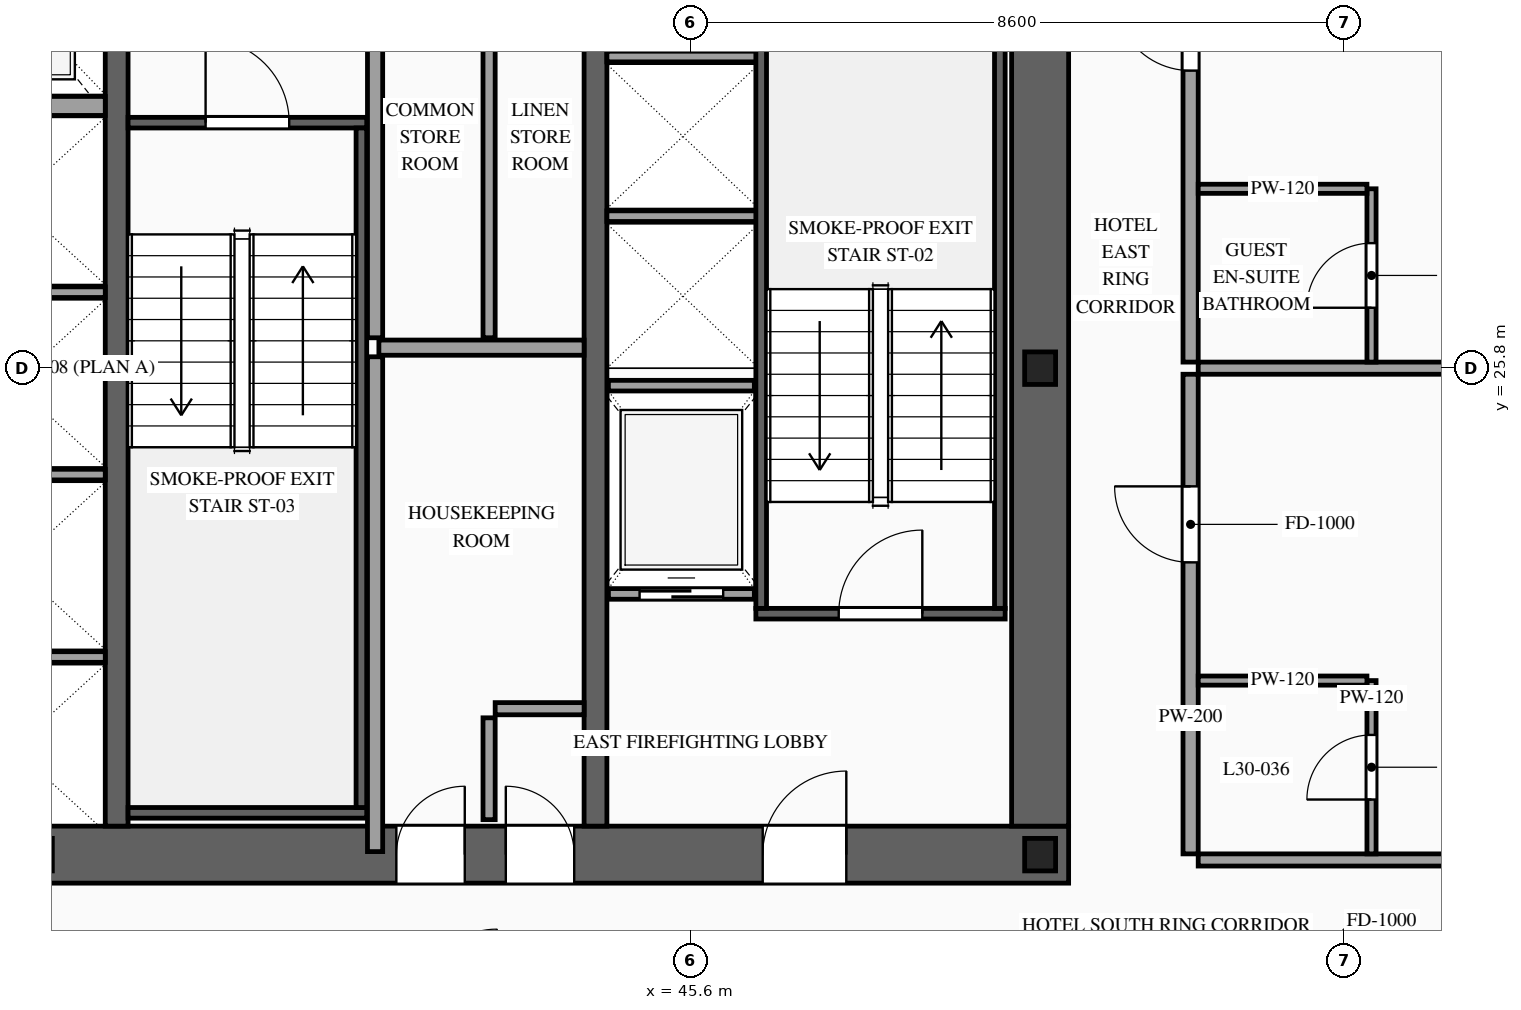
"""IFC4 building model, lengths in metres.
Left out: names, types, materials, properties, quantities, classifications, styles, units other than length and angle.
Written with IfcOpenShell. Run it as: python <this file> out.ifc"""

import sys

from ifc_helpers import new_model, si_unit, direction, frame, frame_2d, origin, origin_2d, place, context, subcontext, project, spatial, rectangle, i_section, extrude, source, transform, mapped, element, fill, save


model = new_model("IFC4")
c1 = context("Model", 3, precision=1e-05, world=origin(), true_north=direction((0.0, 1.0)))
c2 = subcontext(c1, "Body", "Model", "MODEL_VIEW")
j1 = project(units=[si_unit("LENGTHUNIT", "METRE"), si_unit("PLANEANGLEUNIT", "RADIAN")], contexts=[c1])
p1 = place(None, origin())
s1 = spatial("IfcSite", under=j1, at=p1, CompositionType="ELEMENT")
p2 = place(p1, origin())
s2 = spatial("IfcBuilding", under=s1, at=p2, CompositionType="ELEMENT")
p3 = place(p2, frame((0.0, 0.0, 115.4)))
s3 = spatial("IfcBuildingStorey", under=s2, at=p3, CompositionType="ELEMENT", Elevation=115.4)
p4 = place(p3, frame((23.425, 19.4, 0.0), z_axis=(0.0, 0.0, 1.0), x_axis=(1.0, 0.0, 0.0)))
e1 = element("IfcWall", 1, at=p4, inside=s3, PredefinedType="SHEAR", context=c2, shape_type="SweptSolid", body=[
    extrude(rectangle(XDim=27.15, YDim=0.75, at=frame_2d((13.575, 0.0))), origin(), (0.0, 0.0, 1.0), 3.6),
])
p5 = place(p4, frame((2.025, 0.0, 0.0)))
e2 = element("IfcOpeningElement", 2, at=p5, cuts=e1, PredefinedType="OPENING", context=c2, shape_type="SweptSolid", body=[
    extrude(rectangle(XDim=1.1, YDim=2.2, at=frame_2d((0.55, 1.1))), frame((0.0, 0.39, 0.0), z_axis=(0.0, -1.0, 0.0), x_axis=(1.0, 0.0, 0.0)), (0.0, 0.0, 1.0), 0.78),
])
p6 = place(p4, frame((9.925, 0.0, 0.0)))
e3 = element("IfcOpeningElement", 3, at=p6, cuts=e1, PredefinedType="OPENING", context=c2, shape_type="SweptSolid", body=[
    extrude(rectangle(XDim=1.1, YDim=2.2, at=frame_2d((0.55, 1.1))), frame((0.0, 0.39, 0.0), z_axis=(0.0, -1.0, 0.0), x_axis=(1.0, 0.0, 0.0)), (0.0, 0.0, 1.0), 0.78),
])
p7 = place(p4, frame((23.125, 0.0, 0.0)))
e4 = element("IfcOpeningElement", 4, at=p7, cuts=e1, PredefinedType="OPENING", context=c2, shape_type="SweptSolid", body=[
    extrude(rectangle(XDim=1.1, YDim=2.2, at=frame_2d((0.55, 1.1))), frame((0.0, 0.39, 0.0), z_axis=(0.0, -1.0, 0.0), x_axis=(1.0, 0.0, 0.0)), (0.0, 0.0, 1.0), 0.78),
])
p8 = place(p4, frame((19.745, 0.0, 0.0)))
e5 = element("IfcOpeningElement", 5, at=p8, cuts=e1, PredefinedType="OPENING", context=c2, shape_type="SweptSolid", body=[
    extrude(rectangle(XDim=0.9, YDim=2.15, at=frame_2d((0.45, 1.075))), frame((0.0, 0.39, 0.0), z_axis=(0.0, -1.0, 0.0), x_axis=(1.0, 0.0, 0.0)), (0.0, 0.0, 1.0), 0.78),
])
p9 = place(p4, frame((18.305, 0.0, 0.0)))
e6 = element("IfcOpeningElement", 6, at=p9, cuts=e1, PredefinedType="OPENING", context=c2, shape_type="SweptSolid", body=[
    extrude(rectangle(XDim=0.9, YDim=2.15, at=frame_2d((0.45, 1.075))), frame((0.0, 0.39, 0.0), z_axis=(0.0, -1.0, 0.0), x_axis=(1.0, 0.0, 0.0)), (0.0, 0.0, 1.0), 0.78),
])
m1 = source(origin(), c2, "Body", "SweptSolid", [
    extrude(rectangle(XDim=12.05, YDim=0.75, at=frame_2d((6.025, 0.0))), origin(), (0.0, 0.0, 1.0), 3.6),
])
p10 = place(p3, frame((50.2, 19.775, 0.0), z_axis=(0.0, 0.0, 1.0), x_axis=(0.0, 1.0, 0.0)))
e7 = element("IfcWall", 7, at=p10, inside=s3, PredefinedType="SHEAR", context=c2, shape_type="MappedRepresentation", body=[
    mapped(m1, transform((0.0, 0.0, 0.0), scale=1.0)),
])
m2 = source(origin(), c2, "Body", "SweptSolid", [
    extrude(rectangle(XDim=12.05, YDim=0.3, at=frame_2d((6.025, 0.0))), origin(), (0.0, 0.0, 1.0), 3.6),
])
for number, where, z_axis, x_axis in (
    (8, (38.05, 19.775, 0.0), (0.0, 0.0, 1.0), (0.0, 1.0, 0.0)),
    (9, (44.35, 19.775, 0.0), (0.0, 0.0, 1.0), (0.0, 1.0, 0.0)),
):
    element("IfcWall", number, at=place(p3, frame(where, z_axis=z_axis, x_axis=x_axis)), inside=s3, PredefinedType="SOLIDWALL", context=c2, shape_type="MappedRepresentation", body=[
        mapped(m2, transform((0.0, 0.0, 0.0), scale=1.0)),
    ])
m3 = source(origin(), c2, "Body", "SweptSolid", [
    extrude(i_section(OverallWidth=0.407, OverallDepth=0.428, WebThickness=0.02, FlangeThickness=0.035, at=origin_2d()), origin(), (0.0, 0.0, 1.0), 3.6),
])
for number, where, z_axis, x_axis in (
    (10, (37.0, 19.4, 0.0), (0.0, 0.0, 1.0), (1.0, 0.0, 0.0)),
    (11, (50.2, 19.4, 0.0), (0.0, 0.0, 1.0), (1.0, 0.0, 0.0)),
    (12, (50.2, 25.8, 0.0), (0.0, 0.0, 1.0), (1.0, 0.0, 0.0)),
):
    element("IfcColumn", number, at=place(p3, frame(where, z_axis=z_axis, x_axis=x_axis)), inside=s3, PredefinedType="COLUMN", context=c2, shape_type="MappedRepresentation", body=[
        mapped(m3, transform((0.0, 0.0, 0.0), scale=1.0)),
    ])
p11 = place(p3, frame((44.52, 22.83, 0.0), z_axis=(0.0, 0.0, 1.0), x_axis=(1.0, 0.0, 0.0)))
e13 = element("IfcWall", 13, at=p11, inside=s3, PredefinedType="SOLIDWALL", context=c2, shape_type="SweptSolid", body=[
    extrude(rectangle(XDim=1.92, YDim=0.14, at=frame_2d((0.96, 0.0))), origin(), (0.0, 0.0, 1.0), 3.38),
])
p12 = place(p11, frame((0.41, 0.0, 0.0)))
e14 = element("IfcOpeningElement", 14, at=p12, cuts=e13, PredefinedType="OPENING", context=c2, shape_type="SweptSolid", body=[
    extrude(rectangle(XDim=1.1, YDim=2.2, at=frame_2d((0.55, 1.1))), frame((0.0, 0.085, 0.0), z_axis=(0.0, -1.0, 0.0), x_axis=(1.0, 0.0, 0.0)), (0.0, 0.0, 1.0), 0.17),
])
m4 = source(origin(), c2, "Body", "SweptSolid", [
    extrude(rectangle(XDim=1.92, YDim=0.14, at=frame_2d((0.96, 0.0))), origin(), (0.0, 0.0, 1.0), 3.38),
])
p13 = place(p3, frame((44.52, 25.57, 0.0), z_axis=(0.0, 0.0, 1.0), x_axis=(1.0, 0.0, 0.0)))
e15 = element("IfcWall", 15, at=p13, inside=s3, PredefinedType="SOLIDWALL", context=c2, shape_type="MappedRepresentation", body=[
    mapped(m4, transform((0.0, 0.0, 0.0), scale=1.0)),
])
m5 = source(origin(), c2, "Body", "SweptSolid", [
    extrude(rectangle(XDim=2.4, YDim=0.14, at=frame_2d((1.2, 0.0))), origin(), (0.0, 0.0, 1.0), 3.38),
])
for number, where, z_axis, x_axis in (
    (16, (35.5, 22.0, 0.0), (0.0, 0.0, 1.0), (1.0, 0.0, 0.0)),
    (17, (35.5, 24.4, 0.0), (0.0, 0.0, 1.0), (1.0, 0.0, 0.0)),
    (18, (35.5, 26.8, 0.0), (0.0, 0.0, 1.0), (1.0, 0.0, 0.0)),
):
    element("IfcWall", number, at=place(p3, frame(where, z_axis=z_axis, x_axis=x_axis)), inside=s3, PredefinedType="SOLIDWALL", context=c2, shape_type="MappedRepresentation", body=[
        mapped(m5, transform((0.0, 0.0, 0.0), scale=1.0)),
    ])
m6 = source(origin(), c2, "Body", "SweptSolid", [
    extrude(rectangle(XDim=2.4, YDim=0.25, at=frame_2d((1.2, 0.0))), origin(), (0.0, 0.0, 1.0), 3.38),
])
p14 = place(p3, frame((35.5, 29.25, 0.0), z_axis=(0.0, 0.0, 1.0), x_axis=(1.0, 0.0, 0.0)))
e19 = element("IfcWall", 19, at=p14, inside=s3, PredefinedType="SOLIDWALL", context=c2, shape_type="MappedRepresentation", body=[
    mapped(m6, transform((0.0, 0.0, 0.0), scale=1.0)),
])
m7 = source(origin(), c2, "Body", "SweptSolid", [
    extrude(rectangle(XDim=2.0, YDim=0.14, at=frame_2d((1.0, 0.0))), origin(), (0.0, 0.0, 1.0), 3.38),
])
for number, where, z_axis, x_axis in (
    (20, (44.5, 27.8, 0.0), (0.0, 0.0, 1.0), (1.0, 0.0, 0.0)),
    (21, (44.5, 29.9, 0.0), (0.0, 0.0, 1.0), (1.0, 0.0, 0.0)),
):
    element("IfcWall", number, at=place(p3, frame(where, z_axis=z_axis, x_axis=x_axis)), inside=s3, PredefinedType="SOLIDWALL", context=c2, shape_type="MappedRepresentation", body=[
        mapped(m7, transform((0.0, 0.0, 0.0), scale=1.0)),
    ])
p15 = place(p3, frame((46.46, 22.57, 0.0), z_axis=(0.0, 0.0, 1.0), x_axis=(1.0, 0.0, 0.0)))
e22 = element("IfcWall", 22, at=p15, inside=s3, PredefinedType="SOLIDWALL", context=c2, shape_type="SweptSolid", body=[
    extrude(rectangle(XDim=3.28, YDim=0.14, at=frame_2d((1.64, 0.0))), origin(), (0.0, 0.0, 1.0), 3.38),
])
p16 = place(p15, frame((1.09, 0.0, 0.0)))
e23 = element("IfcOpeningElement", 23, at=p16, cuts=e22, PredefinedType="OPENING", context=c2, shape_type="SweptSolid", body=[
    extrude(rectangle(XDim=1.1, YDim=2.2, at=frame_2d((0.55, 1.1))), frame((0.0, 0.085, 0.0), z_axis=(0.0, -1.0, 0.0), x_axis=(1.0, 0.0, 0.0)), (0.0, 0.0, 1.0), 0.17),
])
m8 = source(origin(), c2, "Body", "SweptSolid", [
    extrude(rectangle(XDim=8.94, YDim=0.14, at=frame_2d((4.47, 0.0))), origin(), (0.0, 0.0, 1.0), 3.38),
])
for number, where, z_axis, x_axis in (
    (24, (46.53, 22.64, 0.0), (0.0, 0.0, 1.0), (0.0, 1.0, 0.0)),
    (25, (49.67, 22.64, 0.0), (0.0, 0.0, 1.0), (0.0, 1.0, 0.0)),
):
    element("IfcWall", number, at=place(p3, frame(where, z_axis=z_axis, x_axis=x_axis)), inside=s3, PredefinedType="SOLIDWALL", context=c2, shape_type="MappedRepresentation", body=[
        mapped(m8, transform((0.0, 0.0, 0.0), scale=1.0)),
    ])
p17 = place(p3, frame((38.2, 29.03, 0.0), z_axis=(0.0, 0.0, 1.0), x_axis=(1.0, 0.0, 0.0)))
e26 = element("IfcWall", 26, at=p17, inside=s3, PredefinedType="SOLIDWALL", context=c2, shape_type="SweptSolid", body=[
    extrude(rectangle(XDim=3.14, YDim=0.14, at=frame_2d((1.57, 0.0))), origin(), (0.0, 0.0, 1.0), 3.38),
])
p18 = place(p17, frame((1.02, 0.0, 0.0)))
e27 = element("IfcOpeningElement", 27, at=p18, cuts=e26, PredefinedType="OPENING", context=c2, shape_type="SweptSolid", body=[
    extrude(rectangle(XDim=1.1, YDim=2.2, at=frame_2d((0.55, 1.1))), frame((0.0, 0.085, 0.0), z_axis=(0.0, -1.0, 0.0), x_axis=(1.0, 0.0, 0.0)), (0.0, 0.0, 1.0), 0.17),
])
m9 = source(origin(), c2, "Body", "SweptSolid", [
    extrude(rectangle(XDim=3.14, YDim=0.14, at=frame_2d((1.57, 0.0))), origin(), (0.0, 0.0, 1.0), 3.38),
])
p19 = place(p3, frame((38.2, 19.95, 0.0), z_axis=(0.0, 0.0, 1.0), x_axis=(1.0, 0.0, 0.0)))
e28 = element("IfcWall", 28, at=p19, inside=s3, PredefinedType="SOLIDWALL", context=c2, shape_type="MappedRepresentation", body=[
    mapped(m9, transform((0.0, 0.0, 0.0), scale=1.0)),
])
m10 = source(origin(), c2, "Body", "SweptSolid", [
    extrude(rectangle(XDim=8.94, YDim=0.14, at=frame_2d((4.47, 0.0))), origin(), (0.0, 0.0, 1.0), 3.38),
])
p20 = place(p3, frame((41.27, 20.02, 0.0), z_axis=(0.0, 0.0, 1.0), x_axis=(0.0, 1.0, 0.0)))
e29 = element("IfcWall", 29, at=p20, inside=s3, PredefinedType="SOLIDWALL", context=c2, shape_type="MappedRepresentation", body=[
    mapped(m10, transform((0.0, 0.0, 0.0), scale=1.0)),
])
m11 = source(origin(), c2, "Body", "SweptSolid", [
    extrude(rectangle(XDim=1.34, YDim=0.16, at=frame_2d((0.67, 0.0))), origin(), (0.0, 0.0, 1.0), 3.38),
])
p21 = place(p3, frame((42.95, 19.86, 0.0), z_axis=(0.0, 0.0, 1.0), x_axis=(0.0, 1.0, 0.0)))
e30 = element("IfcWall", 30, at=p21, inside=s3, PredefinedType="PARTITIONING", context=c2, shape_type="MappedRepresentation", body=[
    mapped(m11, transform((0.0, 0.0, 0.0), scale=1.0)),
])
m12 = source(origin(), c2, "Body", "SweptSolid", [
    extrude(rectangle(XDim=1.17, YDim=0.16, at=frame_2d((0.585, 0.0))), origin(), (0.0, 0.0, 1.0), 3.38),
])
p22 = place(p3, frame((43.03, 21.32, 0.0), z_axis=(0.0, 0.0, 1.0), x_axis=(1.0, 0.0, 0.0)))
e31 = element("IfcWall", 31, at=p22, inside=s3, PredefinedType="PARTITIONING", context=c2, shape_type="MappedRepresentation", body=[
    mapped(m12, transform((0.0, 0.0, 0.0), scale=1.0)),
])
m13 = source(origin(), c2, "Body", "SweptSolid", [
    extrude(rectangle(XDim=6.51, YDim=0.2, at=frame_2d((3.255, 0.0))), origin(), (0.0, 0.0, 1.0), 3.38),
])
p23 = place(p3, frame((41.45, 19.44, 0.0), z_axis=(0.0, 0.0, 1.0), x_axis=(0.0, 1.0, 0.0)))
e32 = element("IfcWall", 32, at=p23, inside=s3, PredefinedType="PARTITIONING", context=c2, shape_type="MappedRepresentation", body=[
    mapped(m13, transform((0.0, 0.0, 0.0), scale=1.0)),
])
m14 = source(origin(), c2, "Body", "SweptSolid", [
    extrude(rectangle(XDim=2.7, YDim=0.2, at=frame_2d((1.35, 0.0))), origin(), (0.0, 0.0, 1.0), 3.38),
])
p24 = place(p3, frame((41.5, 26.07, 0.0), z_axis=(0.0, 0.0, 1.0), x_axis=(1.0, 0.0, 0.0)))
e33 = element("IfcWall", 33, at=p24, inside=s3, PredefinedType="PARTITIONING", context=c2, shape_type="MappedRepresentation", body=[
    mapped(m14, transform((0.0, 0.0, 0.0), scale=1.0)),
])
m15 = source(origin(), c2, "Body", "SweptSolid", [
    extrude(rectangle(XDim=5.96, YDim=0.2, at=frame_2d((2.98, 0.0))), origin(), (0.0, 0.0, 1.0), 3.38),
])
p25 = place(p3, frame((41.45, 26.2, 0.0), z_axis=(0.0, 0.0, 1.0), x_axis=(0.0, 1.0, 0.0)))
e34 = element("IfcWall", 34, at=p25, inside=s3, PredefinedType="PARTITIONING", context=c2, shape_type="MappedRepresentation", body=[
    mapped(m15, transform((0.0, 0.0, 0.0), scale=1.0)),
])
m16 = source(origin(), c2, "Body", "SweptSolid", [
    extrude(rectangle(XDim=5.96, YDim=0.16, at=frame_2d((2.98, 0.0))), origin(), (0.0, 0.0, 1.0), 3.38),
])
p26 = place(p3, frame((42.95, 26.2, 0.0), z_axis=(0.0, 0.0, 1.0), x_axis=(0.0, 1.0, 0.0)))
e35 = element("IfcWall", 35, at=p26, inside=s3, PredefinedType="PARTITIONING", context=c2, shape_type="MappedRepresentation", body=[
    mapped(m16, transform((0.0, 0.0, 0.0), scale=1.0)),
])
p27 = place(p3, frame((52.18, 19.41, 0.0), z_axis=(0.0, 0.0, 1.0), x_axis=(0.0, 1.0, 0.0)))
e36 = element("IfcWall", 36, at=p27, inside=s3, PredefinedType="PARTITIONING", context=c2, shape_type="SweptSolid", body=[
    extrude(rectangle(XDim=6.31, YDim=0.2, at=frame_2d((3.155, 0.0))), origin(), (0.0, 0.0, 1.0), 3.38),
])
p28 = place(p27, frame((3.835, 0.0, 0.0)))
e37 = element("IfcOpeningElement", 37, at=p28, cuts=e36, PredefinedType="OPENING", context=c2, shape_type="SweptSolid", body=[
    extrude(rectangle(XDim=1.0, YDim=2.2, at=frame_2d((0.5, 1.1))), frame((0.0, 0.115, 0.0), z_axis=(0.0, -1.0, 0.0), x_axis=(1.0, 0.0, 0.0)), (0.0, 0.0, 1.0), 0.23),
])
m17 = source(origin(), c2, "Body", "SweptSolid", [
    extrude(rectangle(XDim=8.17, YDim=0.16, at=frame_2d((4.085, 0.0))), origin(), (0.0, 0.0, 1.0), 2.675),
])
p29 = place(p3, frame((52.28, 25.8, 0.0), z_axis=(0.0, 0.0, 1.0), x_axis=(1.0, 0.0, 0.0)))
e38 = element("IfcWall", 38, at=p29, inside=s3, PredefinedType="PARTITIONING", context=c2, shape_type="MappedRepresentation", body=[
    mapped(m17, transform((0.0, 0.0, 0.0), scale=1.0)),
])
m18 = source(origin(), c2, "Body", "SweptSolid", [
    extrude(rectangle(XDim=8.17, YDim=0.16, at=frame_2d((4.085, 0.0))), origin(), (0.0, 0.0, 1.0), 2.875),
])
p30 = place(p3, frame((52.28, 19.33, 0.0), z_axis=(0.0, 0.0, 1.0), x_axis=(1.0, 0.0, 0.0)))
e39 = element("IfcWall", 39, at=p30, inside=s3, PredefinedType="PARTITIONING", context=c2, shape_type="MappedRepresentation", body=[
    mapped(m18, transform((0.0, 0.0, 0.0), scale=1.0)),
])
p31 = place(p3, frame((54.56, 19.41, 0.0), z_axis=(0.0, 0.0, 1.0), x_axis=(0.0, 1.0, 0.0)))
e40 = element("IfcWall", 40, at=p31, inside=s3, PredefinedType="PARTITIONING", context=c2, shape_type="SweptSolid", body=[
    extrude(rectangle(XDim=2.28, YDim=0.12, at=frame_2d((1.14, 0.0))), origin(), (0.0, 0.0, 1.0), 3.38),
])
p32 = place(p31, frame((0.715, 0.0, 0.0)))
e41 = element("IfcOpeningElement", 41, at=p32, cuts=e40, PredefinedType="OPENING", context=c2, shape_type="SweptSolid", body=[
    extrude(rectangle(XDim=0.85, YDim=2.1, at=frame_2d((0.425, 1.05))), frame((0.0, 0.075, 0.0), z_axis=(0.0, -1.0, 0.0), x_axis=(1.0, 0.0, 0.0)), (0.0, 0.0, 1.0), 0.15),
])
m19 = source(origin(), c2, "Body", "SweptSolid", [
    extrude(rectangle(XDim=2.22, YDim=0.12, at=frame_2d((1.11, 0.0))), origin(), (0.0, 0.0, 1.0), 3.38),
])
p33 = place(p3, frame((52.28, 21.69, 0.0), z_axis=(0.0, 0.0, 1.0), x_axis=(1.0, 0.0, 0.0)))
e42 = element("IfcWall", 42, at=p33, inside=s3, PredefinedType="PARTITIONING", context=c2, shape_type="MappedRepresentation", body=[
    mapped(m19, transform((0.0, 0.0, 0.0), scale=1.0)),
])
p34 = place(p3, frame((52.18, 25.88, 0.0), z_axis=(0.0, 0.0, 1.0), x_axis=(0.0, 1.0, 0.0)))
e43 = element("IfcWall", 43, at=p34, inside=s3, PredefinedType="PARTITIONING", context=c2, shape_type="SweptSolid", body=[
    extrude(rectangle(XDim=6.31, YDim=0.2, at=frame_2d((3.155, 0.0))), origin(), (0.0, 0.0, 1.0), 3.38),
])
p35 = place(p34, frame((3.835, 0.0, 0.0)))
e44 = element("IfcOpeningElement", 44, at=p35, cuts=e43, PredefinedType="OPENING", context=c2, shape_type="SweptSolid", body=[
    extrude(rectangle(XDim=1.0, YDim=2.2, at=frame_2d((0.5, 1.1))), frame((0.0, 0.115, 0.0), z_axis=(0.0, -1.0, 0.0), x_axis=(1.0, 0.0, 0.0)), (0.0, 0.0, 1.0), 0.23),
])
p36 = place(p3, frame((54.56, 25.88, 0.0), z_axis=(0.0, 0.0, 1.0), x_axis=(0.0, 1.0, 0.0)))
e45 = element("IfcWall", 45, at=p36, inside=s3, PredefinedType="PARTITIONING", context=c2, shape_type="SweptSolid", body=[
    extrude(rectangle(XDim=2.28, YDim=0.12, at=frame_2d((1.14, 0.0))), origin(), (0.0, 0.0, 1.0), 3.38),
])
p37 = place(p36, frame((0.715, 0.0, 0.0)))
e46 = element("IfcOpeningElement", 46, at=p37, cuts=e45, PredefinedType="OPENING", context=c2, shape_type="SweptSolid", body=[
    extrude(rectangle(XDim=0.85, YDim=2.1, at=frame_2d((0.425, 1.05))), frame((0.0, 0.075, 0.0), z_axis=(0.0, -1.0, 0.0), x_axis=(1.0, 0.0, 0.0)), (0.0, 0.0, 1.0), 0.15),
])
p38 = place(p3, frame((52.28, 28.16, 0.0), z_axis=(0.0, 0.0, 1.0), x_axis=(1.0, 0.0, 0.0)))
e47 = element("IfcWall", 47, at=p38, inside=s3, PredefinedType="PARTITIONING", context=c2, shape_type="MappedRepresentation", body=[
    mapped(m19, transform((0.0, 0.0, 0.0), scale=1.0)),
])
m20 = source(origin(), c2, "Body", "SweptSolid", [
    extrude(rectangle(XDim=1.1, YDim=2.2, at=frame_2d((0.55, 1.1))), frame((0.0, 0.025, 0.0), z_axis=(0.0, -1.0, 0.0), x_axis=(1.0, 0.0, 0.0)), (0.0, 0.0, 1.0), 0.05),
])
p39 = place(p12, origin())
e48 = element("IfcDoor", 48, at=p39, inside=s3, OperationType="SLIDING_TO_RIGHT", PredefinedType="DOOR", context=c2, shape_type="MappedRepresentation", body=[
    mapped(m20, transform((0.0, 0.0, 0.0), scale=1.0)),
])
fill(e14, e48)
m21 = source(origin(), c2, "Body", "SweptSolid", [
    extrude(rectangle(XDim=1.1, YDim=2.2, at=frame_2d((0.55, 1.1))), frame((0.0, 0.025, 0.0), z_axis=(0.0, -1.0, 0.0), x_axis=(1.0, 0.0, 0.0)), (0.0, 0.0, 1.0), 0.05),
])
p40 = place(p16, origin())
e49 = element("IfcDoor", 49, at=p40, inside=s3, OperationType="SINGLE_SWING_RIGHT", PredefinedType="DOOR", context=c2, shape_type="MappedRepresentation", body=[
    mapped(m21, transform((0.0, 0.0, 0.0), scale=1.0)),
])
fill(e23, e49)
p41 = place(p18, origin())
e50 = element("IfcDoor", 50, at=p41, inside=s3, OperationType="SINGLE_SWING_LEFT", PredefinedType="DOOR", context=c2, shape_type="MappedRepresentation", body=[
    mapped(m21, transform((0.0, 0.0, 0.0), scale=1.0)),
])
fill(e27, e50)
p42 = place(p7, origin())
e51 = element("IfcDoor", 51, at=p42, inside=s3, OperationType="SINGLE_SWING_RIGHT", PredefinedType="DOOR", context=c2, shape_type="MappedRepresentation", body=[
    mapped(m21, transform((0.0, 0.0, 0.0), scale=1.0)),
])
fill(e4, e51)
m22 = source(origin(), c2, "Body", "SweptSolid", [
    extrude(rectangle(XDim=0.9, YDim=2.15, at=frame_2d((0.45, 1.075))), frame((0.0, 0.025, 0.0), z_axis=(0.0, -1.0, 0.0), x_axis=(1.0, 0.0, 0.0)), (0.0, 0.0, 1.0), 0.05),
])
p43 = place(p8, origin())
e52 = element("IfcDoor", 52, at=p43, inside=s3, OperationType="SINGLE_SWING_LEFT", PredefinedType="DOOR", context=c2, shape_type="MappedRepresentation", body=[
    mapped(m22, transform((0.0, 0.0, 0.0), scale=1.0)),
])
fill(e5, e52)
p44 = place(p9, origin())
e53 = element("IfcDoor", 53, at=p44, inside=s3, OperationType="SINGLE_SWING_RIGHT", PredefinedType="DOOR", context=c2, shape_type="MappedRepresentation", body=[
    mapped(m22, transform((0.0, 0.0, 0.0), scale=1.0)),
])
fill(e6, e53)
m23 = source(origin(), c2, "Body", "SweptSolid", [
    extrude(rectangle(XDim=1.0, YDim=2.2, at=frame_2d((0.5, 1.1))), frame((0.0, 0.025, 0.0), z_axis=(0.0, -1.0, 0.0), x_axis=(1.0, 0.0, 0.0)), (0.0, 0.0, 1.0), 0.05),
])
p45 = place(p28, origin())
e54 = element("IfcDoor", 54, at=p45, inside=s3, OperationType="SINGLE_SWING_RIGHT", PredefinedType="DOOR", context=c2, shape_type="MappedRepresentation", body=[
    mapped(m23, transform((0.0, 0.0, 0.0), scale=1.0)),
])
fill(e37, e54)
m24 = source(origin(), c2, "Body", "SweptSolid", [
    extrude(rectangle(XDim=0.85, YDim=2.1, at=frame_2d((0.425, 1.05))), frame((0.0, 0.025, 0.0), z_axis=(0.0, -1.0, 0.0), x_axis=(1.0, 0.0, 0.0)), (0.0, 0.0, 1.0), 0.05),
])
p46 = place(p32, origin())
e55 = element("IfcDoor", 55, at=p46, inside=s3, OperationType="SINGLE_SWING_LEFT", PredefinedType="DOOR", context=c2, shape_type="MappedRepresentation", body=[
    mapped(m24, transform((0.0, 0.0, 0.0), scale=1.0)),
])
fill(e41, e55)
p47 = place(p35, origin())
e56 = element("IfcDoor", 56, at=p47, inside=s3, OperationType="SINGLE_SWING_RIGHT", PredefinedType="DOOR", context=c2, shape_type="MappedRepresentation", body=[
    mapped(m23, transform((0.0, 0.0, 0.0), scale=1.0)),
])
fill(e44, e56)
p48 = place(p37, origin())
e57 = element("IfcDoor", 57, at=p48, inside=s3, OperationType="SINGLE_SWING_LEFT", PredefinedType="DOOR", context=c2, shape_type="MappedRepresentation", body=[
    mapped(m24, transform((0.0, 0.0, 0.0), scale=1.0)),
])
fill(e46, e57)
save(model, sys.argv[1])
